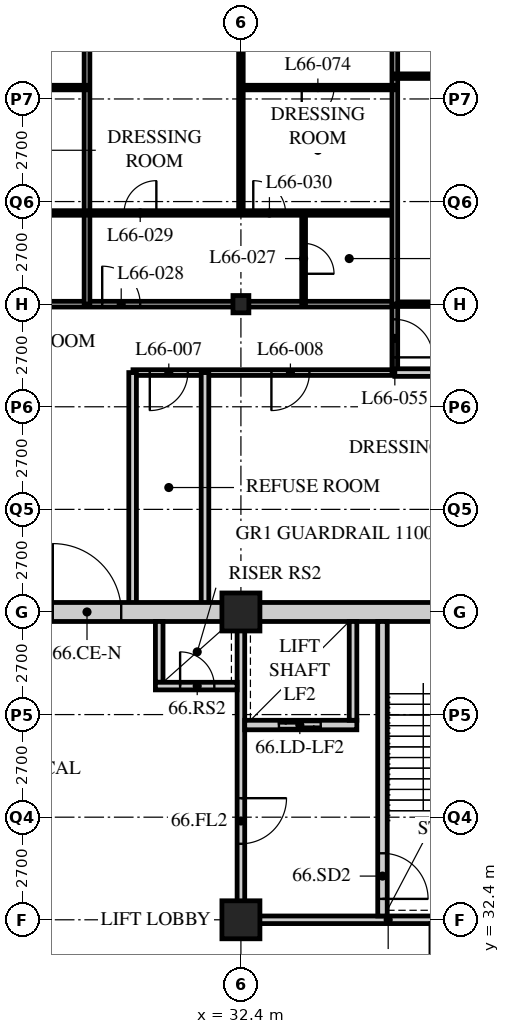
"""IFC4 building model, lengths in metres.
Left out: names, types, materials, properties, quantities, classifications, styles, units other than length and angle.
Written with IfcOpenShell. Run it as: python <this file> out.ifc"""

import sys

from ifc_helpers import new_model, si_unit, direction, frame, frame_2d, origin, origin_2d, place, context, subcontext, project, spatial, rectangle, hollow_rectangle, i_section, extrude, element, fill, save


model = new_model("IFC4")
c1 = context("Model", 3, precision=1e-05, world=origin(), true_north=direction((0.0, 1.0)))
c2 = subcontext(c1, "Body", "Model", "MODEL_VIEW")
j1 = project(units=[si_unit("LENGTHUNIT", "METRE"), si_unit("PLANEANGLEUNIT", "RADIAN")], contexts=[c1])
p1 = place(None, origin())
s1 = spatial("IfcSite", under=j1, at=p1, CompositionType="ELEMENT")
p2 = place(p1, origin())
s2 = spatial("IfcBuilding", under=s1, at=p2, CompositionType="ELEMENT")
p3 = place(p2, frame((0.0, 0.0, 258.0)))
s3 = spatial("IfcBuildingStorey", under=s2, at=p3, CompositionType="ELEMENT", Elevation=258.0)
for number, where, z_axis, x_axis in (
    (1, (32.4, 32.4, 0.0), (0.0, 0.0, 1.0), (1.0, 0.0, 0.0)),
    (2, (32.4, 40.5, 0.0), (0.0, 0.0, 1.0), (1.0, 0.0, 0.0)),
):
    element("IfcColumn", number, at=place(p3, frame(where, z_axis=z_axis, x_axis=x_axis)), inside=s3, PredefinedType="COLUMN", context=c2, shape_type="SweptSolid", body=[
        extrude(hollow_rectangle(XDim=1.0, YDim=1.0, WallThickness=0.1, at=origin_2d()), origin(), (0.0, 0.0, 1.0), 3.9),
    ])
p4 = place(p3, frame((32.4, 48.6, 0.0), z_axis=(0.0, 0.0, 1.0), x_axis=(1.0, 0.0, 0.0)))
e3 = element("IfcColumn", 3, at=p4, inside=s3, PredefinedType="COLUMN", context=c2, shape_type="SweptSolid", body=[
    extrude(i_section(OverallWidth=0.418, OverallDepth=0.456, WebThickness=0.042, FlangeThickness=0.067, FilletRadius=0.015, at=origin_2d()), origin(), (0.0, 0.0, 1.0), 3.9),
])
p5 = place(p3, frame((8.1, 48.6, 0.0), z_axis=(0.0, 0.0, 1.0), x_axis=(1.0, 0.0, 0.0)))
e4 = element("IfcWall", 4, at=p5, inside=s3, PredefinedType="PARTITIONING", context=c2, shape_type="SweptSolid", body=[
    extrude(rectangle(XDim=28.35, YDim=0.15, at=frame_2d((14.175, 0.0))), origin(), (0.0, 0.0, 1.0), 3.078),
])
p6 = place(p5, frame((4.45, 0.0, 0.0)))
e5 = element("IfcOpeningElement", 5, at=p6, cuts=e4, PredefinedType="OPENING", context=c2, shape_type="SweptSolid", body=[
    extrude(rectangle(XDim=1.0, YDim=2.1, at=frame_2d((0.5, 1.05))), frame((0.0, 0.085, 0.0), z_axis=(0.0, -1.0, 0.0), x_axis=(1.0, 0.0, 0.0)), (0.0, 0.0, 1.0), 0.17),
])
p7 = place(p5, frame((20.65, 0.0, 0.0)))
e6 = element("IfcOpeningElement", 6, at=p7, cuts=e4, PredefinedType="OPENING", context=c2, shape_type="SweptSolid", body=[
    extrude(rectangle(XDim=1.0, YDim=2.1, at=frame_2d((0.5, 1.05))), frame((0.0, 0.085, 0.0), z_axis=(0.0, -1.0, 0.0), x_axis=(1.0, 0.0, 0.0)), (0.0, 0.0, 1.0), 0.17),
])
p8 = place(p5, frame((1.525, 0.0, 0.0)))
e7 = element("IfcOpeningElement", 7, at=p8, cuts=e4, PredefinedType="OPENING", context=c2, shape_type="SweptSolid", body=[
    extrude(rectangle(XDim=1.0, YDim=2.1, at=frame_2d((0.5, 1.05))), frame((0.0, 0.085, 0.0), z_axis=(0.0, -1.0, 0.0), x_axis=(1.0, 0.0, 0.0)), (0.0, 0.0, 1.0), 0.17),
])
p9 = place(p3, frame((29.56, 46.8, 0.0), z_axis=(0.0, 0.0, 1.0), x_axis=(1.0, 0.0, 0.0)))
e8 = element("IfcWall", 8, at=p9, inside=s3, PredefinedType="PARTITIONING", context=c2, shape_type="SweptSolid", body=[
    extrude(rectangle(XDim=6.89, YDim=0.15, at=frame_2d((3.445, 0.0))), origin(), (0.0, 0.0, 1.0), 3.69),
])
p10 = place(p9, frame((0.442, 0.0, 0.0)))
e9 = element("IfcOpeningElement", 9, at=p10, cuts=e8, PredefinedType="OPENING", context=c2, shape_type="SweptSolid", body=[
    extrude(rectangle(XDim=1.0, YDim=2.1, at=frame_2d((0.5, 1.05))), frame((0.0, 0.085, 0.0), z_axis=(0.0, -1.0, 0.0), x_axis=(1.0, 0.0, 0.0)), (0.0, 0.0, 1.0), 0.17),
])
p11 = place(p9, frame((3.642, 0.0, 0.0)))
e10 = element("IfcOpeningElement", 10, at=p11, cuts=e8, PredefinedType="OPENING", context=c2, shape_type="SweptSolid", body=[
    extrude(rectangle(XDim=1.0, YDim=2.1, at=frame_2d((0.5, 1.05))), frame((0.0, 0.085, 0.0), z_axis=(0.0, -1.0, 0.0), x_axis=(1.0, 0.0, 0.0)), (0.0, 0.0, 1.0), 0.17),
])
for number, where, z_axis, x_axis in (
    (11, (31.455, 46.8, 0.0), (0.0, 0.0, 1.0), (0.0, -1.0, 0.0)),
    (12, (29.55, 40.5, 0.0), (0.0, 0.0, 1.0), (0.0, 1.0, 0.0)),
):
    element("IfcWall", number, at=place(p3, frame(where, z_axis=z_axis, x_axis=x_axis)), inside=s3, PredefinedType="SOLIDWALL", context=c2, shape_type="SweptSolid", body=[
        extrude(rectangle(XDim=6.3, YDim=0.2, at=frame_2d((3.15, 0.0))), origin(), (0.0, 0.0, 1.0), 3.69),
    ])
p12 = place(p3, frame((36.45, 46.8, 0.0), z_axis=(0.0, 0.0, 1.0), x_axis=(0.0, 1.0, 0.0)))
e13 = element("IfcWall", 13, at=p12, inside=s3, PredefinedType="PARTITIONING", context=c2, shape_type="SweptSolid", body=[
    extrude(rectangle(XDim=1.8, YDim=0.15, at=frame_2d((0.9, 0.0))), origin(), (0.0, 0.0, 1.0), 3.69),
])
p13 = place(p12, frame((0.4, 0.0, 0.0)))
e14 = element("IfcOpeningElement", 14, at=p13, cuts=e13, PredefinedType="OPENING", context=c2, shape_type="SweptSolid", body=[
    extrude(rectangle(XDim=1.0, YDim=2.1, at=frame_2d((0.5, 1.05))), frame((0.0, 0.085, 0.0), z_axis=(0.0, -1.0, 0.0), x_axis=(1.0, 0.0, 0.0)), (0.0, 0.0, 1.0), 0.17),
])
p14 = place(p3, frame((28.35, 48.6, 0.0), z_axis=(0.0, 0.0, 1.0), x_axis=(0.0, 1.0, 0.0)))
e15 = element("IfcWall", 15, at=p14, inside=s3, PredefinedType="PARTITIONING", context=c2, shape_type="SweptSolid", body=[
    extrude(rectangle(XDim=15.9, YDim=0.15, at=frame_2d((7.95, 0.0))), origin(), (0.0, 0.0, 1.0), 3.69),
])
p15 = place(p3, frame((34.05, 48.6, 0.0), z_axis=(0.0, 0.0, 1.0), x_axis=(0.0, 1.0, 0.0)))
e16 = element("IfcWall", 16, at=p15, inside=s3, PredefinedType="PARTITIONING", context=c2, shape_type="SweptSolid", body=[
    extrude(rectangle(XDim=2.4, YDim=0.1, at=frame_2d((1.2, 0.0))), origin(), (0.0, 0.0, 1.0), 3.69),
])
p16 = place(p15, frame((0.8, 0.0, 0.0)))
e17 = element("IfcOpeningElement", 17, at=p16, cuts=e16, PredefinedType="OPENING", context=c2, shape_type="SweptSolid", body=[
    extrude(rectangle(XDim=0.8, YDim=2.1, at=frame_2d((0.4, 1.05))), frame((0.0, 0.06, 0.0), z_axis=(0.0, -1.0, 0.0), x_axis=(1.0, 0.0, 0.0)), (0.0, 0.0, 1.0), 0.12),
])
p17 = place(p3, frame((32.4, 51.0, 0.0), z_axis=(0.0, 0.0, 1.0), x_axis=(0.0, 1.0, 0.0)))
e18 = element("IfcWall", 18, at=p17, inside=s3, PredefinedType="PARTITIONING", context=c2, shape_type="SweptSolid", body=[
    extrude(rectangle(XDim=13.5, YDim=0.12, at=frame_2d((6.75, 0.0))), origin(), (0.0, 0.0, 1.0), 3.078),
])
p18 = place(p3, frame((4.1, 51.0, 0.0), z_axis=(0.0, 0.0, 1.0), x_axis=(1.0, 0.0, 0.0)))
e19 = element("IfcWall", 19, at=p18, inside=s3, PredefinedType="PARTITIONING", context=c2, shape_type="SweptSolid", body=[
    extrude(rectangle(XDim=32.35, YDim=0.12, at=frame_2d((16.175, 0.0))), origin(), (0.0, 0.0, 1.0), 3.69),
])
p19 = place(p18, frame((9.025, 0.0, 0.0)))
e20 = element("IfcOpeningElement", 20, at=p19, cuts=e19, PredefinedType="OPENING", context=c2, shape_type="SweptSolid", body=[
    extrude(rectangle(XDim=0.85, YDim=2.1, at=frame_2d((0.425, 1.05))), frame((0.0, 0.07, 0.0), z_axis=(0.0, -1.0, 0.0), x_axis=(1.0, 0.0, 0.0)), (0.0, 0.0, 1.0), 0.14),
])
p20 = place(p18, frame((16.475, 0.0, 0.0)))
e21 = element("IfcOpeningElement", 21, at=p20, cuts=e19, PredefinedType="OPENING", context=c2, shape_type="SweptSolid", body=[
    extrude(rectangle(XDim=0.85, YDim=2.1, at=frame_2d((0.425, 1.05))), frame((0.0, 0.07, 0.0), z_axis=(0.0, -1.0, 0.0), x_axis=(1.0, 0.0, 0.0)), (0.0, 0.0, 1.0), 0.14),
])
p21 = place(p18, frame((20.525, 0.0, 0.0)))
e22 = element("IfcOpeningElement", 22, at=p21, cuts=e19, PredefinedType="OPENING", context=c2, shape_type="SweptSolid", body=[
    extrude(rectangle(XDim=0.85, YDim=2.1, at=frame_2d((0.425, 1.05))), frame((0.0, 0.07, 0.0), z_axis=(0.0, -1.0, 0.0), x_axis=(1.0, 0.0, 0.0)), (0.0, 0.0, 1.0), 0.14),
])
p22 = place(p18, frame((25.225, 0.0, 0.0)))
e23 = element("IfcOpeningElement", 23, at=p22, cuts=e19, PredefinedType="OPENING", context=c2, shape_type="SweptSolid", body=[
    extrude(rectangle(XDim=0.85, YDim=2.1, at=frame_2d((0.425, 1.05))), frame((0.0, 0.07, 0.0), z_axis=(0.0, -1.0, 0.0), x_axis=(1.0, 0.0, 0.0)), (0.0, 0.0, 1.0), 0.14),
])
p23 = place(p18, frame((28.625, 0.0, 0.0)))
e24 = element("IfcOpeningElement", 24, at=p23, cuts=e19, PredefinedType="OPENING", context=c2, shape_type="SweptSolid", body=[
    extrude(rectangle(XDim=0.85, YDim=2.1, at=frame_2d((0.425, 1.05))), frame((0.0, 0.07, 0.0), z_axis=(0.0, -1.0, 0.0), x_axis=(1.0, 0.0, 0.0)), (0.0, 0.0, 1.0), 0.14),
])
p24 = place(p18, frame((6.725, 0.0, 0.0)))
e25 = element("IfcOpeningElement", 25, at=p24, cuts=e19, PredefinedType="OPENING", context=c2, shape_type="SweptSolid", body=[
    extrude(rectangle(XDim=0.85, YDim=2.1, at=frame_2d((0.425, 1.05))), frame((0.0, 0.07, 0.0), z_axis=(0.0, -1.0, 0.0), x_axis=(1.0, 0.0, 0.0)), (0.0, 0.0, 1.0), 0.14),
])
p25 = place(p18, frame((2.875, 0.0, 0.0)))
e26 = element("IfcOpeningElement", 26, at=p25, cuts=e19, PredefinedType="OPENING", context=c2, shape_type="SweptSolid", body=[
    extrude(rectangle(XDim=0.85, YDim=2.1, at=frame_2d((0.425, 1.05))), frame((0.0, 0.07, 0.0), z_axis=(0.0, -1.0, 0.0), x_axis=(1.0, 0.0, 0.0)), (0.0, 0.0, 1.0), 0.14),
])
p26 = place(p3, frame((36.45, 48.6, 0.0), z_axis=(0.0, 0.0, 1.0), x_axis=(1.0, 0.0, 0.0)))
e27 = element("IfcWall", 27, at=p26, inside=s3, PredefinedType="PARTITIONING", context=c2, shape_type="SweptSolid", body=[
    extrude(rectangle(XDim=6.45, YDim=0.12, at=frame_2d((3.225, 0.0))), origin(), (0.0, 0.0, 1.0), 3.078),
])
p27 = place(p26, frame((2.3, 0.0, 0.0)))
e28 = element("IfcOpeningElement", 28, at=p27, cuts=e27, PredefinedType="OPENING", context=c2, shape_type="SweptSolid", body=[
    extrude(rectangle(XDim=0.85, YDim=2.1, at=frame_2d((0.425, 1.05))), frame((0.0, 0.07, 0.0), z_axis=(0.0, -1.0, 0.0), x_axis=(1.0, 0.0, 0.0)), (0.0, 0.0, 1.0), 0.14),
])
p28 = place(p3, frame((36.45, 46.8, 0.0), z_axis=(0.0, 0.0, 1.0), x_axis=(1.0, 0.0, 0.0)))
e29 = element("IfcWall", 29, at=p28, inside=s3, PredefinedType="SOLIDWALL", context=c2, shape_type="SweptSolid", body=[
    extrude(rectangle(XDim=4.05, YDim=0.2, at=frame_2d((2.025, 0.0))), origin(), (0.0, 0.0, 1.0), 3.69),
])
p29 = place(p3, frame((36.45, 64.5, 0.0), z_axis=(0.0, 0.0, 1.0), x_axis=(0.0, -1.0, 0.0)))
e30 = element("IfcWall", 30, at=p29, inside=s3, PredefinedType="PARTITIONING", context=c2, shape_type="SweptSolid", body=[
    extrude(rectangle(XDim=15.9, YDim=0.15, at=frame_2d((7.95, 0.0))), origin(), (0.0, 0.0, 1.0), 3.69),
])
p30 = place(p3, frame((36.45, 54.6, 0.0), z_axis=(0.0, 0.0, 1.0), x_axis=(1.0, 0.0, 0.0)))
e31 = element("IfcWall", 31, at=p30, inside=s3, PredefinedType="PARTITIONING", context=c2, shape_type="SweptSolid", body=[
    extrude(rectangle(XDim=19.95, YDim=0.12, at=frame_2d((9.975, 0.0))), origin(), (0.0, 0.0, 1.0), 3.69),
])
p31 = place(p30, frame((1.675, 0.0, 0.0)))
e32 = element("IfcOpeningElement", 32, at=p31, cuts=e31, PredefinedType="OPENING", context=c2, shape_type="SweptSolid", body=[
    extrude(rectangle(XDim=0.85, YDim=2.1, at=frame_2d((0.425, 1.05))), frame((0.0, 0.07, 0.0), z_axis=(0.0, -1.0, 0.0), x_axis=(1.0, 0.0, 0.0)), (0.0, 0.0, 1.0), 0.14),
])
p32 = place(p3, frame((24.3, 54.3, 0.0), z_axis=(0.0, 0.0, 1.0), x_axis=(1.0, 0.0, 0.0)))
e33 = element("IfcWall", 33, at=p32, inside=s3, PredefinedType="PARTITIONING", context=c2, shape_type="SweptSolid", body=[
    extrude(rectangle(XDim=4.05, YDim=0.12, at=frame_2d((2.025, 0.0))), origin(), (0.0, 0.0, 1.0), 3.69),
])
p33 = place(p32, frame((1.6, 0.0, 0.0)))
e34 = element("IfcOpeningElement", 34, at=p33, cuts=e33, PredefinedType="OPENING", context=c2, shape_type="SweptSolid", body=[
    extrude(rectangle(XDim=0.85, YDim=2.1, at=frame_2d((0.425, 1.05))), frame((0.0, 0.07, 0.0), z_axis=(0.0, -1.0, 0.0), x_axis=(1.0, 0.0, 0.0)), (0.0, 0.0, 1.0), 0.14),
])
p34 = place(p3, frame((32.4, 54.3, 0.0), z_axis=(0.0, 0.0, 1.0), x_axis=(1.0, 0.0, 0.0)))
e35 = element("IfcWall", 35, at=p34, inside=s3, PredefinedType="PARTITIONING", context=c2, shape_type="SweptSolid", body=[
    extrude(rectangle(XDim=4.05, YDim=0.12, at=frame_2d((2.025, 0.0))), origin(), (0.0, 0.0, 1.0), 3.69),
])
p35 = place(p34, frame((1.6, 0.0, 0.0)))
e36 = element("IfcOpeningElement", 36, at=p35, cuts=e35, PredefinedType="OPENING", context=c2, shape_type="SweptSolid", body=[
    extrude(rectangle(XDim=0.85, YDim=2.1, at=frame_2d((0.425, 1.05))), frame((0.0, 0.07, 0.0), z_axis=(0.0, -1.0, 0.0), x_axis=(1.0, 0.0, 0.0)), (0.0, 0.0, 1.0), 0.14),
])
p36 = place(p3, frame((15.95, 40.5, 0.0), z_axis=(0.0, 0.0, 1.0), x_axis=(1.0, 0.0, 0.0)))
e37 = element("IfcWall", 37, at=p36, inside=s3, PredefinedType="SOLIDWALL", context=c2, shape_type="SweptSolid", body=[
    extrude(rectangle(XDim=24.55, YDim=0.5, at=frame_2d((12.275, 0.0))), origin(), (0.0, 0.0, 1.0), 3.04),
])
p37 = place(p36, frame((11.5, 0.0, 0.0)))
e38 = element("IfcOpeningElement", 38, at=p37, cuts=e37, PredefinedType="OPENING", context=c2, shape_type="SweptSolid", body=[
    extrude(rectangle(XDim=1.8, YDim=2.4, at=frame_2d((0.9, 1.2))), frame((0.0, 0.26, 0.0), z_axis=(0.0, -1.0, 0.0), x_axis=(1.0, 0.0, 0.0)), (0.0, 0.0, 1.0), 0.52),
])
p38 = place(p3, frame((32.3, 32.4, 0.0), z_axis=(0.0, 0.0, 1.0), x_axis=(1.0, 0.0, 0.0)))
e39 = element("IfcWall", 39, at=p38, inside=s3, PredefinedType="SOLIDWALL", context=c2, shape_type="SweptSolid", body=[
    extrude(rectangle(XDim=7.95, YDim=0.2, at=frame_2d((3.975, 0.0))), origin(), (0.0, 0.0, 1.0), 3.078),
])
p39 = place(p3, frame((32.4, 32.5, 0.0), z_axis=(0.0, 0.0, 1.0), x_axis=(0.0, 1.0, 0.0)))
e40 = element("IfcWall", 40, at=p39, inside=s3, PredefinedType="SOLIDWALL", context=c2, shape_type="SweptSolid", body=[
    extrude(rectangle(XDim=7.75, YDim=0.2, at=frame_2d((3.875, 0.0))), origin(), (0.0, 0.0, 1.0), 3.078),
])
p40 = place(p39, frame((1.9, 0.0, 0.0)))
e41 = element("IfcOpeningElement", 41, at=p40, cuts=e40, PredefinedType="OPENING", context=c2, shape_type="SweptSolid", body=[
    extrude(rectangle(XDim=1.2, YDim=2.1, at=frame_2d((0.6, 1.05))), frame((0.0, 0.11, 0.0), z_axis=(0.0, -1.0, 0.0), x_axis=(1.0, 0.0, 0.0)), (0.0, 0.0, 1.0), 0.22),
])
p41 = place(p3, frame((36.125, 32.5, 0.0), z_axis=(0.0, 0.0, 1.0), x_axis=(0.0, 1.0, 0.0)))
e42 = element("IfcWall", 42, at=p41, inside=s3, PredefinedType="SOLIDWALL", context=c2, shape_type="SweptSolid", body=[
    extrude(rectangle(XDim=7.75, YDim=0.25, at=frame_2d((3.875, 0.0))), origin(), (0.0, 0.0, 1.0), 3.69),
])
p42 = place(p41, frame((0.45, 0.0, 0.0)))
e43 = element("IfcOpeningElement", 43, at=p42, cuts=e42, PredefinedType="OPENING", context=c2, shape_type="SweptSolid", body=[
    extrude(rectangle(XDim=1.2, YDim=2.1, at=frame_2d((0.6, 1.05))), frame((0.0, 0.135, 0.0), z_axis=(0.0, -1.0, 0.0), x_axis=(1.0, 0.0, 0.0)), (0.0, 0.0, 1.0), 0.27),
])
p43 = place(p3, frame((32.5, 37.525, 0.0), z_axis=(0.0, 0.0, 1.0), x_axis=(1.0, 0.0, 0.0)))
e44 = element("IfcWall", 44, at=p43, inside=s3, PredefinedType="SOLIDWALL", context=c2, shape_type="SweptSolid", body=[
    extrude(rectangle(XDim=2.95, YDim=0.25, at=frame_2d((1.475, 0.0))), origin(), (0.0, 0.0, 1.0), 3.69),
])
p44 = place(p43, frame((0.9, 0.0, 0.0)))
e45 = element("IfcOpeningElement", 45, at=p44, cuts=e44, PredefinedType="OPENING", context=c2, shape_type="SweptSolid", body=[
    extrude(rectangle(XDim=1.1, YDim=2.4, at=frame_2d((0.55, 1.2))), frame((0.0, 0.135, 0.0), z_axis=(0.0, -1.0, 0.0), x_axis=(1.0, 0.0, 0.0)), (0.0, 0.0, 1.0), 0.27),
])
p45 = place(p3, frame((35.35, 37.65, 0.0), z_axis=(0.0, 0.0, 1.0), x_axis=(0.0, 1.0, 0.0)))
e46 = element("IfcWall", 46, at=p45, inside=s3, PredefinedType="SOLIDWALL", context=c2, shape_type="SweptSolid", body=[
    extrude(rectangle(XDim=2.6, YDim=0.2, at=frame_2d((1.3, 0.0))), origin(), (0.0, 0.0, 1.0), 3.69),
])
p46 = place(p3, frame((30.25, 38.65, 0.0), z_axis=(0.0, 0.0, 1.0), x_axis=(0.0, 1.0, 0.0)))
e47 = element("IfcWall", 47, at=p46, inside=s3, PredefinedType="SOLIDWALL", context=c2, shape_type="SweptSolid", body=[
    extrude(rectangle(XDim=1.6, YDim=0.2, at=frame_2d((0.8, 0.0))), origin(), (0.0, 0.0, 1.0), 3.69),
])
p47 = place(p3, frame((30.15, 38.55, 0.0), z_axis=(0.0, 0.0, 1.0), x_axis=(1.0, 0.0, 0.0)))
e48 = element("IfcWall", 48, at=p47, inside=s3, PredefinedType="SOLIDWALL", context=c2, shape_type="SweptSolid", body=[
    extrude(rectangle(XDim=2.15, YDim=0.2, at=frame_2d((1.075, 0.0))), origin(), (0.0, 0.0, 1.0), 3.69),
])
p48 = place(p47, frame((0.65, 0.0, 0.0)))
e49 = element("IfcOpeningElement", 49, at=p48, cuts=e48, PredefinedType="OPENING", context=c2, shape_type="SweptSolid", body=[
    extrude(rectangle(XDim=0.9, YDim=2.1, at=frame_2d((0.45, 1.05))), frame((0.0, 0.11, 0.0), z_axis=(0.0, -1.0, 0.0), x_axis=(1.0, 0.0, 0.0)), (0.0, 0.0, 1.0), 0.22),
])
p49 = place(p10, origin())
e50 = element("IfcDoor", 50, at=p49, inside=s3, OperationType="SINGLE_SWING_RIGHT", PredefinedType="DOOR", context=c2, shape_type="SweptSolid", body=[
    extrude(rectangle(XDim=1.0, YDim=2.1, at=frame_2d((0.5, 1.05))), frame((0.0, 0.025, 0.0), z_axis=(0.0, -1.0, 0.0), x_axis=(1.0, 0.0, 0.0)), (0.0, 0.0, 1.0), 0.05),
])
fill(e9, e50)
p50 = place(p11, origin())
e51 = element("IfcDoor", 51, at=p50, inside=s3, OperationType="SINGLE_SWING_RIGHT", PredefinedType="DOOR", context=c2, shape_type="SweptSolid", body=[
    extrude(rectangle(XDim=1.0, YDim=2.1, at=frame_2d((0.5, 1.05))), frame((0.0, 0.025, 0.0), z_axis=(0.0, -1.0, 0.0), x_axis=(1.0, 0.0, 0.0)), (0.0, 0.0, 1.0), 0.05),
])
fill(e10, e51)
p51 = place(p16, origin())
e52 = element("IfcDoor", 52, at=p51, inside=s3, OperationType="SINGLE_SWING_RIGHT", PredefinedType="DOOR", context=c2, shape_type="SweptSolid", body=[
    extrude(rectangle(XDim=0.8, YDim=2.1, at=frame_2d((0.4, 1.05))), frame((0.0, 0.025, 0.0), z_axis=(0.0, -1.0, 0.0), x_axis=(1.0, 0.0, 0.0)), (0.0, 0.0, 1.0), 0.05),
])
fill(e17, e52)
p52 = place(p7, origin())
e53 = element("IfcDoor", 53, at=p52, inside=s3, OperationType="SINGLE_SWING_LEFT", PredefinedType="DOOR", context=c2, shape_type="SweptSolid", body=[
    extrude(rectangle(XDim=1.0, YDim=2.1, at=frame_2d((0.5, 1.05))), frame((0.0, 0.025, 0.0), z_axis=(0.0, -1.0, 0.0), x_axis=(1.0, 0.0, 0.0)), (0.0, 0.0, 1.0), 0.05),
])
fill(e6, e53)
p53 = place(p22, origin())
e54 = element("IfcDoor", 54, at=p53, inside=s3, OperationType="SINGLE_SWING_RIGHT", PredefinedType="DOOR", context=c2, shape_type="SweptSolid", body=[
    extrude(rectangle(XDim=0.85, YDim=2.1, at=frame_2d((0.425, 1.05))), frame((0.0, 0.025, 0.0), z_axis=(0.0, -1.0, 0.0), x_axis=(1.0, 0.0, 0.0)), (0.0, 0.0, 1.0), 0.05),
])
fill(e23, e54)
p54 = place(p23, origin())
e55 = element("IfcDoor", 55, at=p54, inside=s3, OperationType="SINGLE_SWING_LEFT", PredefinedType="DOOR", context=c2, shape_type="SweptSolid", body=[
    extrude(rectangle(XDim=0.85, YDim=2.1, at=frame_2d((0.425, 1.05))), frame((0.0, 0.025, 0.0), z_axis=(0.0, -1.0, 0.0), x_axis=(1.0, 0.0, 0.0)), (0.0, 0.0, 1.0), 0.05),
])
fill(e24, e55)
p55 = place(p13, origin())
e56 = element("IfcDoor", 56, at=p55, inside=s3, OperationType="SINGLE_SWING_RIGHT", PredefinedType="DOOR", context=c2, shape_type="SweptSolid", body=[
    extrude(rectangle(XDim=1.0, YDim=2.1, at=frame_2d((0.5, 1.05))), frame((0.0, 0.025, 0.0), z_axis=(0.0, -1.0, 0.0), x_axis=(1.0, 0.0, 0.0)), (0.0, 0.0, 1.0), 0.05),
])
fill(e14, e56)
p56 = place(p35, origin())
e57 = element("IfcDoor", 57, at=p56, inside=s3, OperationType="SINGLE_SWING_RIGHT", PredefinedType="DOOR", context=c2, shape_type="SweptSolid", body=[
    extrude(rectangle(XDim=0.85, YDim=2.1, at=frame_2d((0.425, 1.05))), frame((0.0, 0.025, 0.0), z_axis=(0.0, -1.0, 0.0), x_axis=(1.0, 0.0, 0.0)), (0.0, 0.0, 1.0), 0.05),
])
fill(e36, e57)
p57 = place(p42, origin())
e58 = element("IfcDoor", 58, at=p57, inside=s3, OperationType="SINGLE_SWING_RIGHT", PredefinedType="DOOR", context=c2, shape_type="SweptSolid", body=[
    extrude(rectangle(XDim=1.2, YDim=2.1, at=frame_2d((0.6, 1.05))), frame((0.0, 0.025, 0.0), z_axis=(0.0, -1.0, 0.0), x_axis=(1.0, 0.0, 0.0)), (0.0, 0.0, 1.0), 0.05),
])
fill(e43, e58)
p58 = place(p40, origin())
e59 = element("IfcDoor", 59, at=p58, inside=s3, OperationType="SINGLE_SWING_LEFT", PredefinedType="DOOR", context=c2, shape_type="SweptSolid", body=[
    extrude(rectangle(XDim=1.2, YDim=2.1, at=frame_2d((0.6, 1.05))), frame((0.0, 0.025, 0.0), z_axis=(0.0, -1.0, 0.0), x_axis=(1.0, 0.0, 0.0)), (0.0, 0.0, 1.0), 0.05),
])
fill(e41, e59)
p59 = place(p48, origin())
e60 = element("IfcDoor", 60, at=p59, inside=s3, OperationType="SINGLE_SWING_LEFT", PredefinedType="DOOR", context=c2, shape_type="SweptSolid", body=[
    extrude(rectangle(XDim=0.9, YDim=2.1, at=frame_2d((0.45, 1.05))), frame((0.0, 0.025, 0.0), z_axis=(0.0, -1.0, 0.0), x_axis=(1.0, 0.0, 0.0)), (0.0, 0.0, 1.0), 0.05),
])
fill(e49, e60)
p60 = place(p44, origin())
e61 = element("IfcDoor", 61, at=p60, inside=s3, OperationType="DOUBLE_DOOR_SLIDING", PredefinedType="DOOR", context=c2, shape_type="SweptSolid", body=[
    extrude(rectangle(XDim=1.1, YDim=2.4, at=frame_2d((0.55, 1.2))), frame((0.0, 0.025, 0.0), z_axis=(0.0, -1.0, 0.0), x_axis=(1.0, 0.0, 0.0)), (0.0, 0.0, 1.0), 0.05),
])
fill(e45, e61)
p61 = place(p37, origin())
e62 = element("IfcDoor", 62, at=p61, inside=s3, OperationType="DOUBLE_DOOR_SINGLE_SWING", PredefinedType="DOOR", context=c2, shape_type="SweptSolid", body=[
    extrude(rectangle(XDim=1.8, YDim=2.4, at=frame_2d((0.9, 1.2))), frame((0.0, 0.025, 0.0), z_axis=(0.0, -1.0, 0.0), x_axis=(1.0, 0.0, 0.0)), (0.0, 0.0, 1.0), 0.05),
])
fill(e38, e62)
save(model, sys.argv[1])
